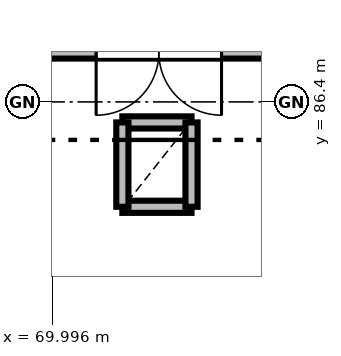
"""IFC4 building model, lengths in metres.
Left out: names, types, materials, properties, quantities, classifications, styles, units other than length and angle.
Written with IfcOpenShell. Run it as: python <this file> out.ifc"""

import sys

from ifc_helpers import new_model, si_unit, direction, frame, frame_2d, origin, place, context, subcontext, project, spatial, rectangle, extrude, element, fill, save


model = new_model("IFC4")
c1 = context("Model", 3, precision=1e-05, world=origin(), true_north=direction((0.0, 1.0)))
c2 = subcontext(c1, "Body", "Model", "MODEL_VIEW")
j1 = project(units=[si_unit("LENGTHUNIT", "METRE"), si_unit("PLANEANGLEUNIT", "RADIAN")], contexts=[c1])
p1 = place(None, origin())
s1 = spatial("IfcSite", under=j1, at=p1, CompositionType="ELEMENT")
p2 = place(p1, origin())
s2 = spatial("IfcBuilding", under=s1, at=p2, CompositionType="ELEMENT")
p3 = place(p2, frame((0.0, 0.0, 5.1)))
s3 = spatial("IfcBuildingStorey", under=s2, at=p3, CompositionType="ELEMENT", Elevation=5.1)
for number, where, z_axis, x_axis in (
    (1, (70.92, 85.02, 0.0), (0.0, 0.0, 1.0), (1.0, 0.0, 0.0)),
    (2, (71.83, 86.13, 0.0), (0.0, 0.0, 1.0), (-1.0, 0.0, 0.0)),
):
    element("IfcWall", number, at=place(p3, frame(where, z_axis=z_axis, x_axis=x_axis)), inside=s3, PredefinedType="PARTITIONING", context=c2, shape_type="SweptSolid", body=[
        extrude(rectangle(XDim=0.91, YDim=0.16, at=frame_2d((0.455, 0.0))), origin(), (0.0, 0.0, 1.0), 3.65),
    ])
for number, where, z_axis, x_axis in (
    (3, (70.92, 86.13, 0.0), (0.0, 0.0, 1.0), (0.0, -1.0, 0.0)),
    (4, (71.83, 85.02, 0.0), (0.0, 0.0, 1.0), (0.0, 1.0, 0.0)),
):
    element("IfcWall", number, at=place(p3, frame(where, z_axis=z_axis, x_axis=x_axis)), inside=s3, PredefinedType="PARTITIONING", context=c2, shape_type="SweptSolid", body=[
        extrude(rectangle(XDim=1.11, YDim=0.16, at=frame_2d((0.555, 0.0))), origin(), (0.0, 0.0, 1.0), 3.65),
    ])
p4 = place(p3, frame((72.91, 87.05, 0.0), z_axis=(0.0, 0.0, 1.0), x_axis=(-1.0, 0.0, 0.0)))
e5 = element("IfcWall", 5, at=p4, inside=s3, PredefinedType="PARTITIONING", context=c2, shape_type="SweptSolid", body=[
    extrude(rectangle(XDim=5.71, YDim=0.16, at=frame_2d((2.855, 0.0))), origin(), (0.0, 0.0, 1.0), 3.305),
])
p5 = place(p4, frame((0.685, 0.0, 0.0)))
e6 = element("IfcOpeningElement", 6, at=p5, cuts=e5, PredefinedType="OPENING", context=c2, shape_type="SweptSolid", body=[
    extrude(rectangle(XDim=1.65, YDim=2.2, at=frame_2d((0.825, 1.1))), frame((0.0, 0.09, 0.0), z_axis=(0.0, -1.0, 0.0), x_axis=(1.0, 0.0, 0.0)), (0.0, 0.0, 1.0), 0.18),
])
p6 = place(p5, origin())
e7 = element("IfcDoor", 7, at=p6, inside=s3, OperationType="DOUBLE_DOOR_SINGLE_SWING", PredefinedType="DOOR", context=c2, shape_type="SweptSolid", body=[
    extrude(rectangle(XDim=1.65, YDim=2.2, at=frame_2d((0.825, 1.1))), frame((0.0, 0.025, 0.0), z_axis=(0.0, -1.0, 0.0), x_axis=(1.0, 0.0, 0.0)), (0.0, 0.0, 1.0), 0.05),
])
fill(e6, e7)
save(model, sys.argv[1])
